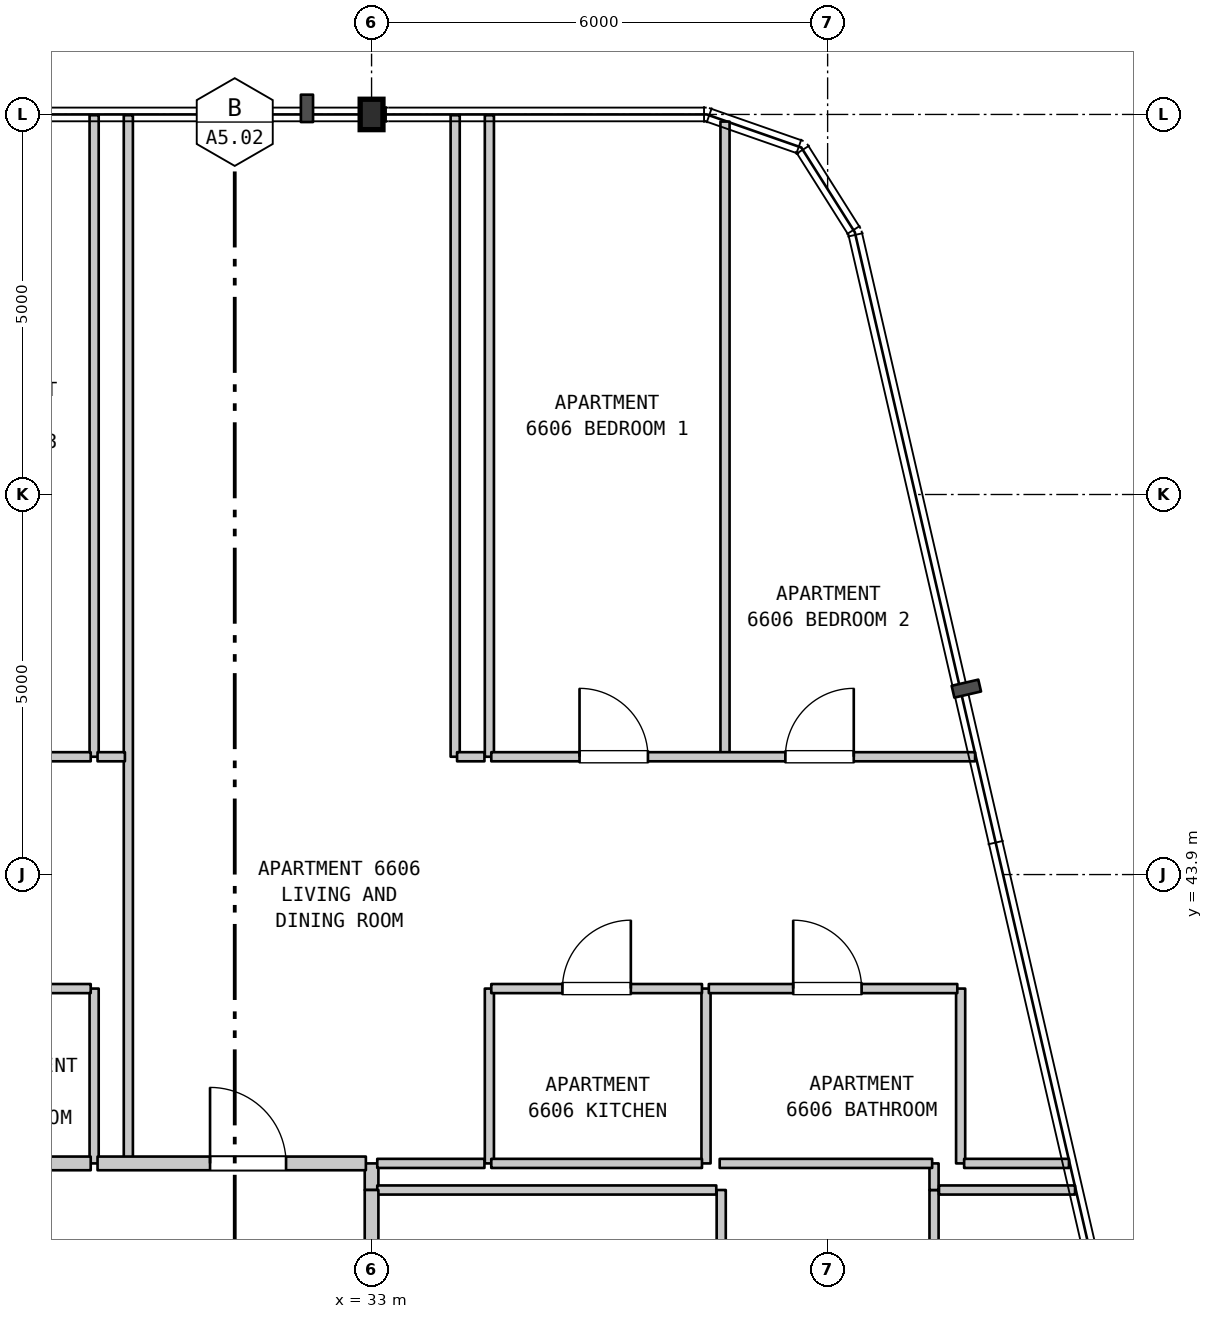
"""IFC4 building model, lengths in metres.
Left out: names, types, materials, properties, quantities, classifications, styles, units other than length and angle.
Written with IfcOpenShell. Run it as: python <this file> out.ifc"""

import sys

from ifc_helpers import new_model, si_unit, direction, frame, frame_2d, origin, origin_2d, place, context, subcontext, project, spatial, rectangle, i_section, extrude, element, fill, save


model = new_model("IFC4")
c1 = context("Model", 3, precision=1e-05, world=origin(), true_north=direction((0.0, 1.0)))
c2 = subcontext(c1, "Body", "Model", "MODEL_VIEW")
j1 = project(units=[si_unit("LENGTHUNIT", "METRE"), si_unit("PLANEANGLEUNIT", "RADIAN")], contexts=[c1])
p1 = place(None, origin())
s1 = spatial("IfcSite", under=j1, at=p1, CompositionType="ELEMENT")
p2 = place(p1, origin())
s2 = spatial("IfcBuilding", under=s1, at=p2, CompositionType="ELEMENT")
p3 = place(p2, frame((0.0, 0.0, 265.8)))
s3 = spatial("IfcBuildingStorey", under=s2, at=p3, CompositionType="ELEMENT", Elevation=265.8)
p4 = place(p3, frame((33.0, 53.9, 0.0), z_axis=(0.0, 0.0, 1.0), x_axis=(1.0, 0.0, 0.0)))
e1 = element("IfcColumn", 1, at=p4, inside=s3, PredefinedType="COLUMN", context=c2, shape_type="SweptSolid", body=[
    extrude(i_section(OverallWidth=0.3, OverallDepth=0.4, WebThickness=0.013, FlangeThickness=0.024, FilletRadius=0.027, at=origin_2d()), origin(), (0.0, 0.0, 1.0), 3.7),
])
p5 = place(p3, frame((29.35, 40.1, 0.0), z_axis=(0.0, 0.0, 1.0), x_axis=(0.0, 1.0, 0.0)))
e2 = element("IfcWall", 2, at=p5, inside=s3, PredefinedType="PARTITIONING", context=c2, shape_type="SweptSolid", body=[
    extrude(rectangle(XDim=2.3, YDim=0.12, at=frame_2d((1.15, 0.0))), origin(), (0.0, 0.0, 1.0), 3.39),
])
p6 = place(p3, frame((29.35, 45.45, 0.0), z_axis=(0.0, 0.0, 1.0), x_axis=(0.0, 1.0, 0.0)))
e3 = element("IfcWall", 3, at=p6, inside=s3, PredefinedType="PARTITIONING", context=c2, shape_type="SweptSolid", body=[
    extrude(rectangle(XDim=8.44, YDim=0.12, at=frame_2d((4.22, 0.0))), origin(), (0.0, 0.0, 1.0), 3.39),
])
p7 = place(p3, frame((29.8, 40.1, 0.0), z_axis=(0.0, 0.0, 1.0), x_axis=(0.0, 1.0, 0.0)))
e4 = element("IfcWall", 4, at=p7, inside=s3, PredefinedType="PARTITIONING", context=c2, shape_type="SweptSolid", body=[
    extrude(rectangle(XDim=13.79, YDim=0.12, at=frame_2d((6.895, 0.0))), origin(), (0.0, 0.0, 1.0), 3.39),
])
p8 = place(p3, frame((33.0, 39.75, 0.0), z_axis=(0.0, 0.0, 1.0), x_axis=(0.0, 1.0, 0.0)))
e5 = element("IfcWall", 5, at=p8, inside=s3, PredefinedType="STANDARD", context=c2, shape_type="SweptSolid", body=[
    extrude(rectangle(XDim=0.35, YDim=0.18, at=frame_2d((0.175, 0.0))), origin(), (0.0, 0.0, 1.0), 3.39),
])
p9 = place(p3, frame((34.1, 45.45, 0.0), z_axis=(0.0, 0.0, 1.0), x_axis=(0.0, 1.0, 0.0)))
e6 = element("IfcWall", 6, at=p9, inside=s3, PredefinedType="PARTITIONING", context=c2, shape_type="SweptSolid", body=[
    extrude(rectangle(XDim=8.44, YDim=0.12, at=frame_2d((4.22, 0.0))), origin(), (0.0, 0.0, 1.0), 3.39),
])
p10 = place(p3, frame((34.55, 40.1, 0.0), z_axis=(0.0, 0.0, 1.0), x_axis=(0.0, 1.0, 0.0)))
e7 = element("IfcWall", 7, at=p10, inside=s3, PredefinedType="PARTITIONING", context=c2, shape_type="SweptSolid", body=[
    extrude(rectangle(XDim=2.3, YDim=0.12, at=frame_2d((1.15, 0.0))), origin(), (0.0, 0.0, 1.0), 3.39),
])
p11 = place(p3, frame((34.55, 45.45, 0.0), z_axis=(0.0, 0.0, 1.0), x_axis=(0.0, 1.0, 0.0)))
e8 = element("IfcWall", 8, at=p11, inside=s3, PredefinedType="PARTITIONING", context=c2, shape_type="SweptSolid", body=[
    extrude(rectangle(XDim=8.44, YDim=0.12, at=frame_2d((4.22, 0.0))), origin(), (0.0, 0.0, 1.0), 3.39),
])
p12 = place(p3, frame((37.4, 40.1, 0.0), z_axis=(0.0, 0.0, 1.0), x_axis=(0.0, 1.0, 0.0)))
e9 = element("IfcWall", 9, at=p12, inside=s3, PredefinedType="PARTITIONING", context=c2, shape_type="SweptSolid", body=[
    extrude(rectangle(XDim=2.3, YDim=0.12, at=frame_2d((1.15, 0.0))), origin(), (0.0, 0.0, 1.0), 3.39),
])
p13 = place(p3, frame((37.6, 36.095, 0.0), z_axis=(0.0, 0.0, 1.0), x_axis=(0.0, 1.0, 0.0)))
e10 = element("IfcWall", 10, at=p13, inside=s3, PredefinedType="PARTITIONING", context=c2, shape_type="SweptSolid", body=[
    extrude(rectangle(XDim=3.655, YDim=0.12, at=frame_2d((1.828, 0.0))), origin(), (0.0, 0.0, 1.0), 3.39),
])
p14 = place(p13, frame((1.377, 0.0, 0.0)))
e11 = element("IfcOpeningElement", 11, at=p14, cuts=e10, PredefinedType="OPENING", context=c2, shape_type="SweptSolid", body=[
    extrude(rectangle(XDim=0.9, YDim=2.15, at=frame_2d((0.45, 1.075))), frame((0.0, 0.07, 0.0), z_axis=(0.0, -1.0, 0.0), x_axis=(1.0, 0.0, 0.0)), (0.0, 0.0, 1.0), 0.14),
])
p15 = place(p3, frame((37.65, 45.45, 0.0), z_axis=(0.0, 0.0, 1.0), x_axis=(0.0, 1.0, 0.0)))
e12 = element("IfcWall", 12, at=p15, inside=s3, PredefinedType="PARTITIONING", context=c2, shape_type="SweptSolid", body=[
    extrude(rectangle(XDim=8.356, YDim=0.12, at=frame_2d((4.178, 0.0))), origin(), (0.0, 0.0, 1.0), 3.39),
])
p16 = place(p3, frame((40.4, 29.0, 0.0), z_axis=(0.0, 0.0, 1.0), x_axis=(0.0, 1.0, 0.0)))
e13 = element("IfcWall", 13, at=p16, inside=s3, PredefinedType="PARTITIONING", context=c2, shape_type="SweptSolid", body=[
    extrude(rectangle(XDim=10.75, YDim=0.12, at=frame_2d((5.375, 0.0))), origin(), (0.0, 0.0, 1.0), 3.39),
])
p17 = place(p16, frame((2.413, 0.0, 0.0)))
e14 = element("IfcOpeningElement", 14, at=p17, cuts=e13, PredefinedType="OPENING", context=c2, shape_type="SweptSolid", body=[
    extrude(rectangle(XDim=0.9, YDim=2.15, at=frame_2d((0.45, 1.075))), frame((0.0, 0.07, 0.0), z_axis=(0.0, -1.0, 0.0), x_axis=(1.0, 0.0, 0.0)), (0.0, 0.0, 1.0), 0.14),
])
p18 = place(p16, frame((7.438, 0.0, 0.0)))
e15 = element("IfcOpeningElement", 15, at=p18, cuts=e13, PredefinedType="OPENING", context=c2, shape_type="SweptSolid", body=[
    extrude(rectangle(XDim=0.9, YDim=2.15, at=frame_2d((0.45, 1.075))), frame((0.0, 0.07, 0.0), z_axis=(0.0, -1.0, 0.0), x_axis=(1.0, 0.0, 0.0)), (0.0, 0.0, 1.0), 0.14),
])
p19 = place(p3, frame((40.4, 39.75, 0.0), z_axis=(0.0, 0.0, 1.0), x_axis=(0.0, 1.0, 0.0)))
e16 = element("IfcWall", 16, at=p19, inside=s3, PredefinedType="PARTITIONING", context=c2, shape_type="SweptSolid", body=[
    extrude(rectangle(XDim=0.35, YDim=0.12, at=frame_2d((0.175, 0.0))), origin(), (0.0, 0.0, 1.0), 3.39),
])
p20 = place(p3, frame((40.75, 40.1, 0.0), z_axis=(0.0, 0.0, 1.0), x_axis=(0.0, 1.0, 0.0)))
e17 = element("IfcWall", 17, at=p20, inside=s3, PredefinedType="PARTITIONING", context=c2, shape_type="SweptSolid", body=[
    extrude(rectangle(XDim=2.3, YDim=0.12, at=frame_2d((1.15, 0.0))), origin(), (0.0, 0.0, 1.0), 3.39),
])
p21 = place(p3, frame((33.075, 39.75, 0.0), z_axis=(0.0, 0.0, 1.0), x_axis=(1.0, 0.0, 0.0)))
e18 = element("IfcWall", 18, at=p21, inside=s3, PredefinedType="PARTITIONING", context=c2, shape_type="SweptSolid", body=[
    extrude(rectangle(XDim=4.46, YDim=0.12, at=frame_2d((2.23, 0.0))), origin(), (0.0, 0.0, 1.0), 3.39),
])
p22 = place(p3, frame((40.465, 39.75, 0.0), z_axis=(0.0, 0.0, 1.0), x_axis=(1.0, 0.0, 0.0)))
e19 = element("IfcWall", 19, at=p22, inside=s3, PredefinedType="PARTITIONING", context=c2, shape_type="SweptSolid", body=[
    extrude(rectangle(XDim=1.79, YDim=0.12, at=frame_2d((0.895, 0.0))), origin(), (0.0, 0.0, 1.0), 3.39),
])
p23 = place(p3, frame((25.561, 40.1, 0.0), z_axis=(0.0, 0.0, 1.0), x_axis=(1.0, 0.0, 0.0)))
e20 = element("IfcWall", 20, at=p23, inside=s3, PredefinedType="STANDARD", context=c2, shape_type="SweptSolid", body=[
    extrude(rectangle(XDim=3.744, YDim=0.18, at=frame_2d((1.872, 0.0))), origin(), (0.0, 0.0, 1.0), 3.39),
])
p24 = place(p3, frame((29.395, 40.1, 0.0), z_axis=(0.0, 0.0, 1.0), x_axis=(1.0, 0.0, 0.0)))
e21 = element("IfcWall", 21, at=p24, inside=s3, PredefinedType="STANDARD", context=c2, shape_type="SweptSolid", body=[
    extrude(rectangle(XDim=3.53, YDim=0.18, at=frame_2d((1.765, 0.0))), origin(), (0.0, 0.0, 1.0), 3.39),
])
p25 = place(p24, frame((1.48, 0.0, 0.0)))
e22 = element("IfcOpeningElement", 22, at=p25, cuts=e21, PredefinedType="OPENING", context=c2, shape_type="SweptSolid", body=[
    extrude(rectangle(XDim=1.0, YDim=2.15, at=frame_2d((0.5, 1.075))), frame((0.0, 0.1, 0.0), z_axis=(0.0, -1.0, 0.0), x_axis=(1.0, 0.0, 0.0)), (0.0, 0.0, 1.0), 0.2),
])
p26 = place(p3, frame((33.075, 40.1, 0.0), z_axis=(0.0, 0.0, 1.0), x_axis=(1.0, 0.0, 0.0)))
e23 = element("IfcWall", 23, at=p26, inside=s3, PredefinedType="PARTITIONING", context=c2, shape_type="SweptSolid", body=[
    extrude(rectangle(XDim=1.41, YDim=0.12, at=frame_2d((0.705, 0.0))), origin(), (0.0, 0.0, 1.0), 3.39),
])
p27 = place(p3, frame((34.575, 40.1, 0.0), z_axis=(0.0, 0.0, 1.0), x_axis=(1.0, 0.0, 0.0)))
e24 = element("IfcWall", 24, at=p27, inside=s3, PredefinedType="PARTITIONING", context=c2, shape_type="SweptSolid", body=[
    extrude(rectangle(XDim=2.772, YDim=0.12, at=frame_2d((1.386, 0.0))), origin(), (0.0, 0.0, 1.0), 3.39),
])
p28 = place(p3, frame((37.58, 40.1, 0.0), z_axis=(0.0, 0.0, 1.0), x_axis=(1.0, 0.0, 0.0)))
e25 = element("IfcWall", 25, at=p28, inside=s3, PredefinedType="PARTITIONING", context=c2, shape_type="SweptSolid", body=[
    extrude(rectangle(XDim=2.795, YDim=0.12, at=frame_2d((1.397, 0.0))), origin(), (0.0, 0.0, 1.0), 3.39),
])
p29 = place(p3, frame((40.796, 40.1, 0.0), z_axis=(0.0, 0.0, 1.0), x_axis=(1.0, 0.0, 0.0)))
e26 = element("IfcWall", 26, at=p29, inside=s3, PredefinedType="PARTITIONING", context=c2, shape_type="SweptSolid", body=[
    extrude(rectangle(XDim=1.379, YDim=0.12, at=frame_2d((0.689, 0.0))), origin(), (0.0, 0.0, 1.0), 3.39),
])
p30 = place(p3, frame((25.561, 42.4, 0.0), z_axis=(0.0, 0.0, 1.0), x_axis=(1.0, 0.0, 0.0)))
e27 = element("IfcWall", 27, at=p30, inside=s3, PredefinedType="PARTITIONING", context=c2, shape_type="SweptSolid", body=[
    extrude(rectangle(XDim=3.744, YDim=0.12, at=frame_2d((1.872, 0.0))), origin(), (0.0, 0.0, 1.0), 3.39),
])
p31 = place(p30, frame((1.351, 0.0, 0.0)))
e28 = element("IfcOpeningElement", 28, at=p31, cuts=e27, PredefinedType="OPENING", context=c2, shape_type="SweptSolid", body=[
    extrude(rectangle(XDim=0.9, YDim=2.1, at=frame_2d((0.45, 1.05))), frame((0.0, 0.07, 0.0), z_axis=(0.0, -1.0, 0.0), x_axis=(1.0, 0.0, 0.0)), (0.0, 0.0, 1.0), 0.14),
])
p32 = place(p3, frame((34.575, 42.4, 0.0), z_axis=(0.0, 0.0, 1.0), x_axis=(1.0, 0.0, 0.0)))
e29 = element("IfcWall", 29, at=p32, inside=s3, PredefinedType="PARTITIONING", context=c2, shape_type="SweptSolid", body=[
    extrude(rectangle(XDim=2.772, YDim=0.12, at=frame_2d((1.386, 0.0))), origin(), (0.0, 0.0, 1.0), 3.39),
])
p33 = place(p32, frame((0.936, 0.0, 0.0)))
e30 = element("IfcOpeningElement", 30, at=p33, cuts=e29, PredefinedType="OPENING", context=c2, shape_type="SweptSolid", body=[
    extrude(rectangle(XDim=0.9, YDim=2.15, at=frame_2d((0.45, 1.075))), frame((0.0, 0.07, 0.0), z_axis=(0.0, -1.0, 0.0), x_axis=(1.0, 0.0, 0.0)), (0.0, 0.0, 1.0), 0.14),
])
p34 = place(p3, frame((37.437, 42.4, 0.0), z_axis=(0.0, 0.0, 1.0), x_axis=(1.0, 0.0, 0.0)))
e31 = element("IfcWall", 31, at=p34, inside=s3, PredefinedType="PARTITIONING", context=c2, shape_type="SweptSolid", body=[
    extrude(rectangle(XDim=3.269, YDim=0.12, at=frame_2d((1.635, 0.0))), origin(), (0.0, 0.0, 1.0), 3.39),
])
p35 = place(p34, frame((1.11, 0.0, 0.0)))
e32 = element("IfcOpeningElement", 32, at=p35, cuts=e31, PredefinedType="OPENING", context=c2, shape_type="SweptSolid", body=[
    extrude(rectangle(XDim=0.9, YDim=2.1, at=frame_2d((0.45, 1.05))), frame((0.0, 0.07, 0.0), z_axis=(0.0, -1.0, 0.0), x_axis=(1.0, 0.0, 0.0)), (0.0, 0.0, 1.0), 0.14),
])
p36 = place(p3, frame((22.295, 45.45, 0.0), z_axis=(0.0, 0.0, 1.0), x_axis=(1.0, 0.0, 0.0)))
e33 = element("IfcWall", 33, at=p36, inside=s3, PredefinedType="PARTITIONING", context=c2, shape_type="SweptSolid", body=[
    extrude(rectangle(XDim=7.01, YDim=0.12, at=frame_2d((3.505, 0.0))), origin(), (0.0, 0.0, 1.0), 3.39),
])
p37 = place(p36, frame((0.863, 0.0, 0.0)))
e34 = element("IfcOpeningElement", 34, at=p37, cuts=e33, PredefinedType="OPENING", context=c2, shape_type="SweptSolid", body=[
    extrude(rectangle(XDim=0.9, YDim=2.15, at=frame_2d((0.45, 1.075))), frame((0.0, 0.07, 0.0), z_axis=(0.0, -1.0, 0.0), x_axis=(1.0, 0.0, 0.0)), (0.0, 0.0, 1.0), 0.14),
])
p38 = place(p36, frame((2.985, 0.0, 0.0)))
e35 = element("IfcOpeningElement", 35, at=p38, cuts=e33, PredefinedType="OPENING", context=c2, shape_type="SweptSolid", body=[
    extrude(rectangle(XDim=0.9, YDim=2.15, at=frame_2d((0.45, 1.075))), frame((0.0, 0.07, 0.0), z_axis=(0.0, -1.0, 0.0), x_axis=(1.0, 0.0, 0.0)), (0.0, 0.0, 1.0), 0.14),
])
p39 = place(p36, frame((5.246, 0.0, 0.0)))
e36 = element("IfcOpeningElement", 36, at=p39, cuts=e33, PredefinedType="OPENING", context=c2, shape_type="SweptSolid", body=[
    extrude(rectangle(XDim=0.9, YDim=2.15, at=frame_2d((0.45, 1.075))), frame((0.0, 0.07, 0.0), z_axis=(0.0, -1.0, 0.0), x_axis=(1.0, 0.0, 0.0)), (0.0, 0.0, 1.0), 0.14),
])
p40 = place(p3, frame((29.395, 45.45, 0.0), z_axis=(0.0, 0.0, 1.0), x_axis=(1.0, 0.0, 0.0)))
e37 = element("IfcWall", 37, at=p40, inside=s3, PredefinedType="PARTITIONING", context=c2, shape_type="SweptSolid", body=[
    extrude(rectangle(XDim=0.36, YDim=0.12, at=frame_2d((0.18, 0.0))), origin(), (0.0, 0.0, 1.0), 3.39),
])
p41 = place(p3, frame((34.125, 45.45, 0.0), z_axis=(0.0, 0.0, 1.0), x_axis=(1.0, 0.0, 0.0)))
e38 = element("IfcWall", 38, at=p41, inside=s3, PredefinedType="PARTITIONING", context=c2, shape_type="SweptSolid", body=[
    extrude(rectangle(XDim=0.36, YDim=0.12, at=frame_2d((0.18, 0.0))), origin(), (0.0, 0.0, 1.0), 3.39),
])
p42 = place(p3, frame((34.575, 45.45, 0.0), z_axis=(0.0, 0.0, 1.0), x_axis=(1.0, 0.0, 0.0)))
e39 = element("IfcWall", 39, at=p42, inside=s3, PredefinedType="PARTITIONING", context=c2, shape_type="SweptSolid", body=[
    extrude(rectangle(XDim=6.365, YDim=0.12, at=frame_2d((3.183, 0.0))), origin(), (0.0, 0.0, 1.0), 3.39),
])
p43 = place(p42, frame((1.161, 0.0, 0.0)))
e40 = element("IfcOpeningElement", 40, at=p43, cuts=e39, PredefinedType="OPENING", context=c2, shape_type="SweptSolid", body=[
    extrude(rectangle(XDim=0.9, YDim=2.15, at=frame_2d((0.45, 1.075))), frame((0.0, 0.07, 0.0), z_axis=(0.0, -1.0, 0.0), x_axis=(1.0, 0.0, 0.0)), (0.0, 0.0, 1.0), 0.14),
])
p44 = place(p42, frame((3.869, 0.0, 0.0)))
e41 = element("IfcOpeningElement", 41, at=p44, cuts=e39, PredefinedType="OPENING", context=c2, shape_type="SweptSolid", body=[
    extrude(rectangle(XDim=0.9, YDim=2.15, at=frame_2d((0.45, 1.075))), frame((0.0, 0.07, 0.0), z_axis=(0.0, -1.0, 0.0), x_axis=(1.0, 0.0, 0.0)), (0.0, 0.0, 1.0), 0.14),
])
p45 = place(p3, frame((33.0, 37.9, 0.0), z_axis=(0.0, 0.0, 1.0), x_axis=(0.0, 1.0, 0.0)))
e42 = element("IfcWall", 42, at=p45, inside=s3, PredefinedType="STANDARD", context=c2, shape_type="SweptSolid", body=[
    extrude(rectangle(XDim=1.85, YDim=0.18, at=frame_2d((0.925, 0.0))), origin(), (0.0, 0.0, 1.0), 2.79),
])
p46 = place(p25, origin())
e43 = element("IfcDoor", 43, at=p46, inside=s3, OperationType="SINGLE_SWING_LEFT", PredefinedType="DOOR", context=c2, shape_type="SweptSolid", body=[
    extrude(rectangle(XDim=1.0, YDim=2.15, at=frame_2d((0.5, 1.075))), frame((0.0, 0.025, 0.0), z_axis=(0.0, -1.0, 0.0), x_axis=(1.0, 0.0, 0.0)), (0.0, 0.0, 1.0), 0.05),
])
fill(e22, e43)
p47 = place(p33, origin())
e44 = element("IfcDoor", 44, at=p47, inside=s3, OperationType="SINGLE_SWING_RIGHT", PredefinedType="DOOR", context=c2, shape_type="SweptSolid", body=[
    extrude(rectangle(XDim=0.9, YDim=2.15, at=frame_2d((0.45, 1.075))), frame((0.0, 0.025, 0.0), z_axis=(0.0, -1.0, 0.0), x_axis=(1.0, 0.0, 0.0)), (0.0, 0.0, 1.0), 0.05),
])
fill(e30, e44)
p48 = place(p35, origin())
e45 = element("IfcDoor", 45, at=p48, inside=s3, OperationType="SINGLE_SWING_LEFT", PredefinedType="DOOR", context=c2, shape_type="SweptSolid", body=[
    extrude(rectangle(XDim=0.9, YDim=2.1, at=frame_2d((0.45, 1.05))), frame((0.0, 0.025, 0.0), z_axis=(0.0, -1.0, 0.0), x_axis=(1.0, 0.0, 0.0)), (0.0, 0.0, 1.0), 0.05),
])
fill(e32, e45)
p49 = place(p43, origin())
e46 = element("IfcDoor", 46, at=p49, inside=s3, OperationType="SINGLE_SWING_LEFT", PredefinedType="DOOR", context=c2, shape_type="SweptSolid", body=[
    extrude(rectangle(XDim=0.9, YDim=2.15, at=frame_2d((0.45, 1.075))), frame((0.0, 0.025, 0.0), z_axis=(0.0, -1.0, 0.0), x_axis=(1.0, 0.0, 0.0)), (0.0, 0.0, 1.0), 0.05),
])
fill(e40, e46)
p50 = place(p44, origin())
e47 = element("IfcDoor", 47, at=p50, inside=s3, OperationType="SINGLE_SWING_RIGHT", PredefinedType="DOOR", context=c2, shape_type="SweptSolid", body=[
    extrude(rectangle(XDim=0.9, YDim=2.15, at=frame_2d((0.45, 1.075))), frame((0.0, 0.025, 0.0), z_axis=(0.0, -1.0, 0.0), x_axis=(1.0, 0.0, 0.0)), (0.0, 0.0, 1.0), 0.05),
])
fill(e41, e47)
save(model, sys.argv[1])
